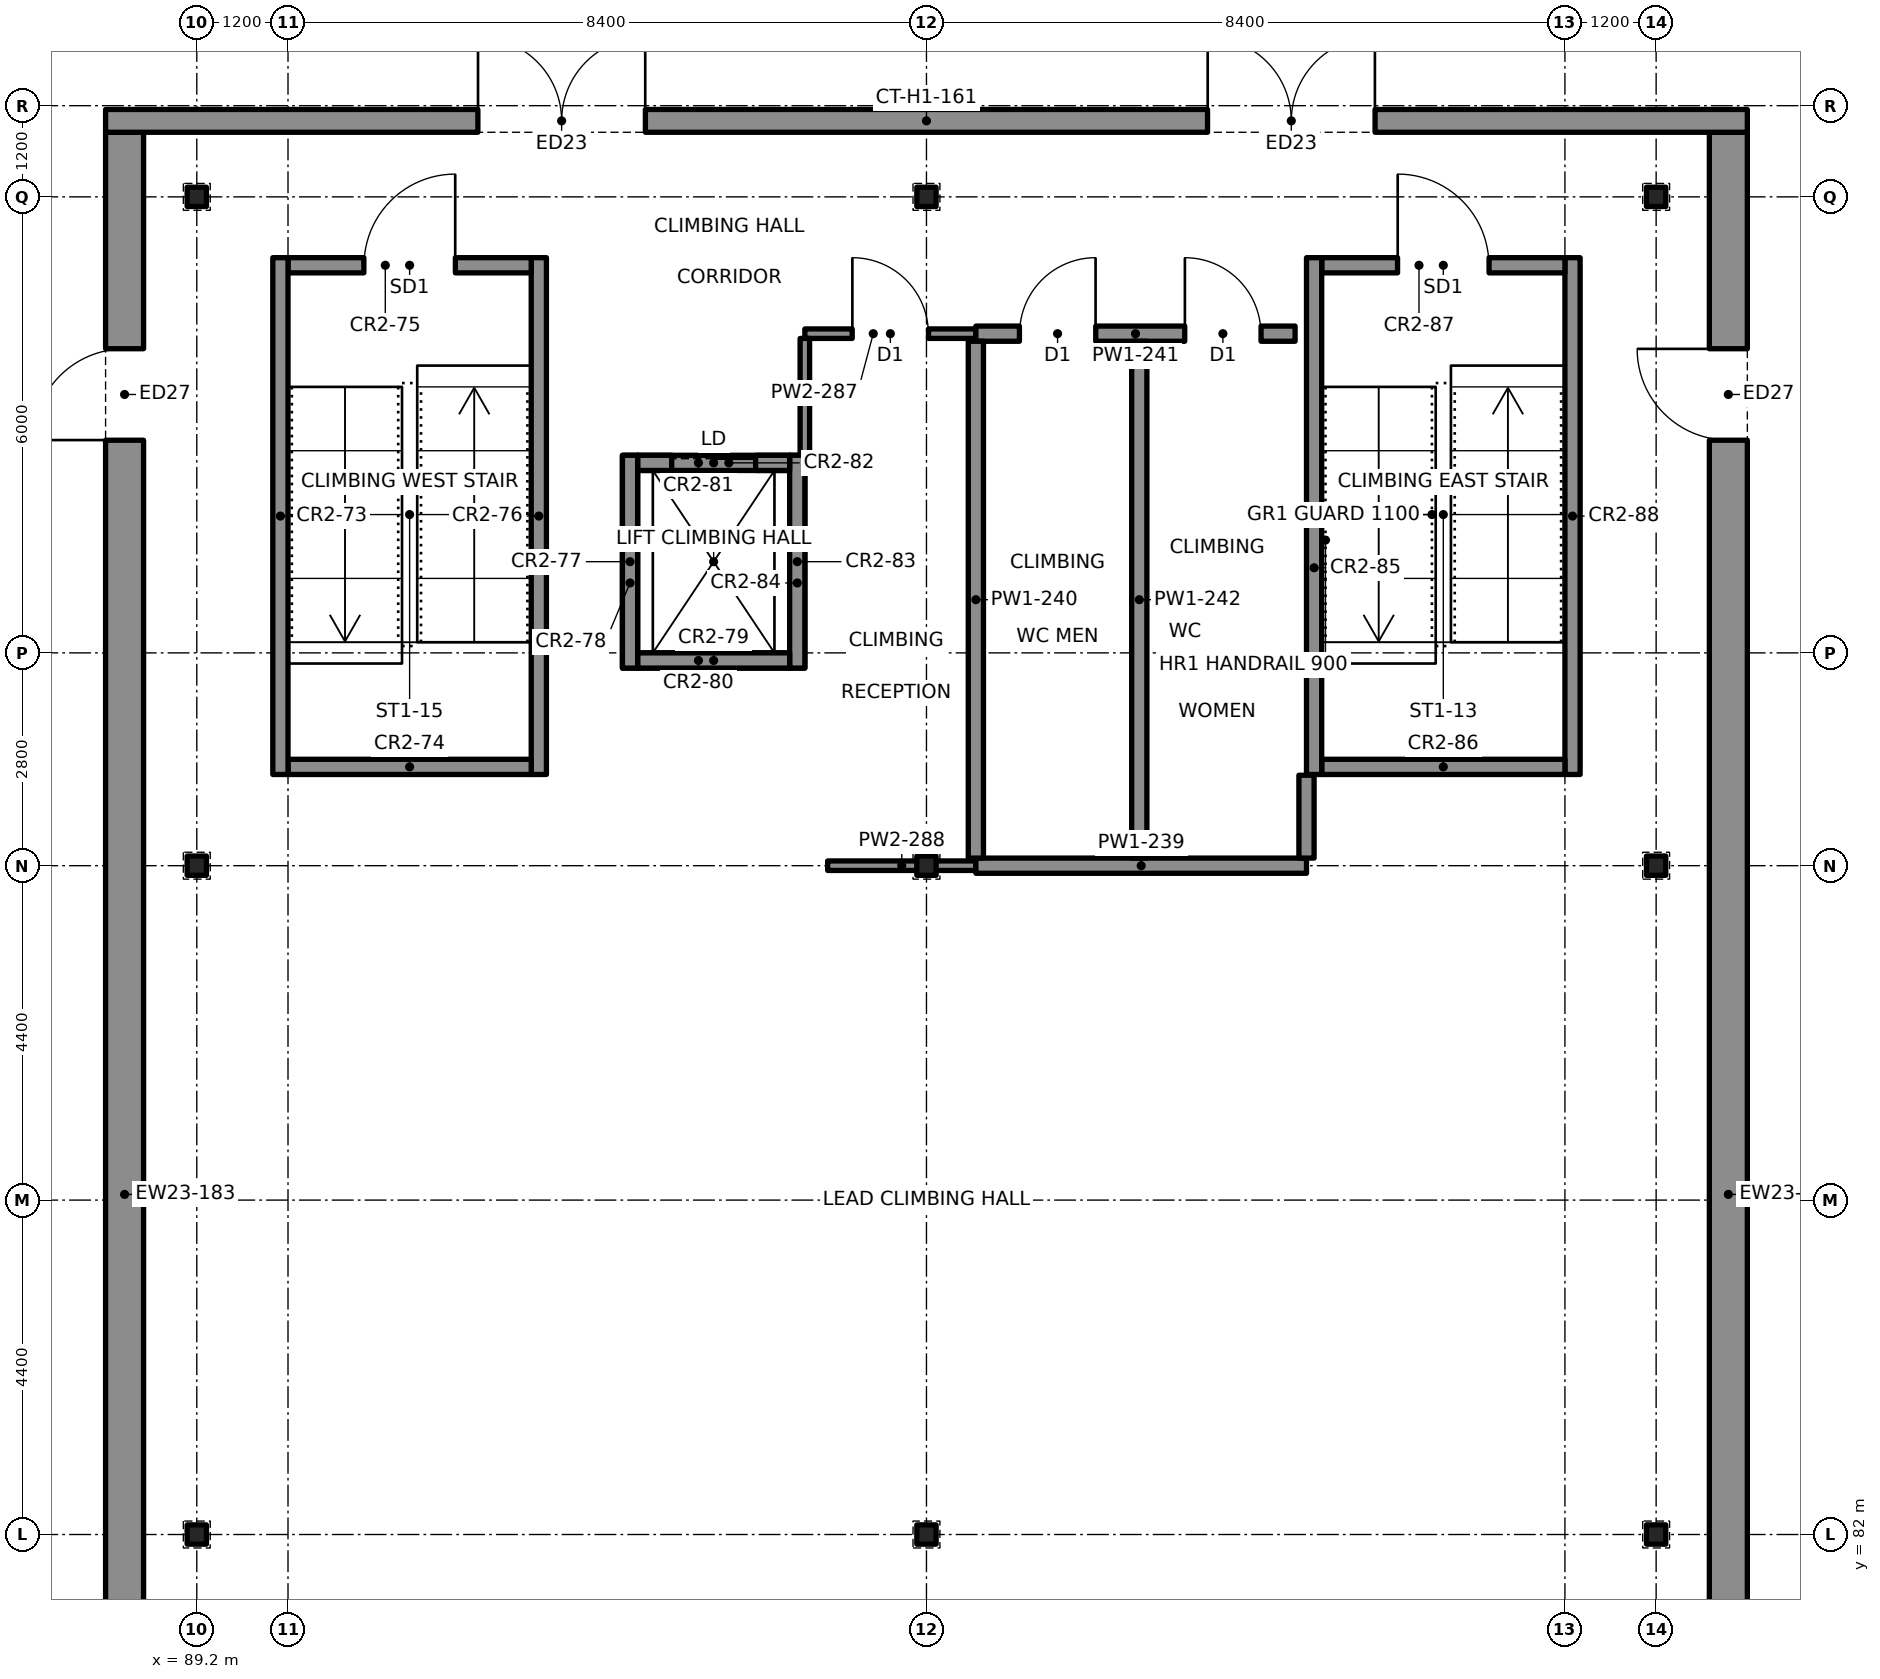
"""IFC4 building model, lengths in metres.
Left out: names, types, materials, properties, quantities, classifications, styles, units other than length and angle.
Written with IfcOpenShell. Run it as: python <this file> out.ifc"""

import sys

from ifc_helpers import new_model, si_unit, direction, frame, frame_2d, origin, origin_2d, place, context, subcontext, project, spatial, rectangle, hollow_rectangle, extrude, element, fill, save


model = new_model("IFC4")
c1 = context("Model", 3, precision=1e-05, world=origin(), true_north=direction((0.0, 1.0)))
c2 = subcontext(c1, "Body", "Model", "MODEL_VIEW")
j1 = project(units=[si_unit("LENGTHUNIT", "METRE"), si_unit("PLANEANGLEUNIT", "RADIAN")], contexts=[c1])
p1 = place(None, origin())
s1 = spatial("IfcSite", under=j1, at=p1, CompositionType="ELEMENT")
p2 = place(p1, origin())
s2 = spatial("IfcBuilding", under=s1, at=p2, CompositionType="ELEMENT")
p3 = place(p2, origin())
s3 = spatial("IfcBuildingStorey", under=s2, at=p3, CompositionType="ELEMENT", Elevation=0.0)
for number, where, z_axis, x_axis in (
    (1, (89.2, 82.0, -0.5), (0.0, 0.0, 1.0), (1.0, 0.0, 0.0)),
    (2, (89.2, 90.8, -0.5), (0.0, 0.0, 1.0), (1.0, 0.0, 0.0)),
    (3, (89.2, 99.6, -0.5), (0.0, 0.0, 1.0), (1.0, 0.0, 0.0)),
    (4, (98.8, 82.0, -0.5), (0.0, 0.0, 1.0), (1.0, 0.0, 0.0)),
    (5, (98.8, 90.8, -0.5), (0.0, 0.0, 1.0), (1.0, 0.0, 0.0)),
    (6, (98.8, 99.6, -0.5), (0.0, 0.0, 1.0), (1.0, 0.0, 0.0)),
    (7, (108.4, 82.0, -0.5), (0.0, 0.0, 1.0), (1.0, 0.0, 0.0)),
    (8, (108.4, 90.8, -0.5), (0.0, 0.0, 1.0), (1.0, 0.0, 0.0)),
    (9, (108.4, 99.6, -0.5), (0.0, 0.0, 1.0), (1.0, 0.0, 0.0)),
):
    element("IfcColumn", number, at=place(p3, frame(where, z_axis=z_axis, x_axis=x_axis)), inside=s3, PredefinedType="COLUMN", context=c2, shape_type="SweptSolid", body=[
        extrude(hollow_rectangle(XDim=0.254, YDim=0.254, WallThickness=0.013, at=origin_2d()), origin(), (0.0, 0.0, 1.0), 4.9),
    ])
p4 = place(p3, frame((88.0, 100.6, -0.5), z_axis=(0.0, 0.0, 1.0), x_axis=(1.0, 0.0, 0.0)))
e10 = element("IfcWall", 10, at=p4, inside=s3, PredefinedType="SOLIDWALL", context=c2, shape_type="SweptSolid", body=[
    extrude(rectangle(XDim=21.6, YDim=0.3, at=frame_2d((10.8, 0.0))), origin(), (0.0, 0.0, 1.0), 4.9),
])
p5 = place(p4, frame((4.9, 0.0, 0.5)))
e11 = element("IfcOpeningElement", 11, at=p5, cuts=e10, PredefinedType="OPENING", context=c2, shape_type="SweptSolid", body=[
    extrude(rectangle(XDim=2.2, YDim=2.4, at=frame_2d((1.1, 1.2))), frame((0.0, 0.16, 0.0), z_axis=(0.0, -1.0, 0.0), x_axis=(1.0, 0.0, 0.0)), (0.0, 0.0, 1.0), 0.32),
])
p6 = place(p4, frame((14.5, 0.0, 0.5)))
e12 = element("IfcOpeningElement", 12, at=p6, cuts=e10, PredefinedType="OPENING", context=c2, shape_type="SweptSolid", body=[
    extrude(rectangle(XDim=2.2, YDim=2.4, at=frame_2d((1.1, 1.2))), frame((0.0, 0.16, 0.0), z_axis=(0.0, -1.0, 0.0), x_axis=(1.0, 0.0, 0.0)), (0.0, 0.0, 1.0), 0.32),
])
p7 = place(p3, frame((88.25, 72.5, 0.0), z_axis=(0.0, 0.0, 1.0), x_axis=(0.0, 1.0, 0.0)))
e13 = element("IfcWall", 13, at=p7, inside=s3, PredefinedType="SOLIDWALL", context=c2, shape_type="SweptSolid", body=[
    extrude(rectangle(XDim=27.95, YDim=0.5, at=frame_2d((13.975, 0.0))), origin(), (0.0, 0.0, 1.0), 4.4),
])
p8 = place(p7, frame((4.0, 0.0, 0.0)))
e14 = element("IfcOpeningElement", 14, at=p8, cuts=e13, PredefinedType="OPENING", context=c2, shape_type="SweptSolid", body=[
    extrude(rectangle(XDim=2.2, YDim=2.4, at=frame_2d((1.1, 1.2))), frame((0.0, 0.26, 0.0), z_axis=(0.0, -1.0, 0.0), x_axis=(1.0, 0.0, 0.0)), (0.0, 0.0, 1.0), 0.52),
])
p9 = place(p7, frame((23.9, 0.0, 0.0)))
e15 = element("IfcOpeningElement", 15, at=p9, cuts=e13, PredefinedType="OPENING", context=c2, shape_type="SweptSolid", body=[
    extrude(rectangle(XDim=1.2, YDim=2.4, at=frame_2d((0.6, 1.2))), frame((0.0, 0.26, 0.0), z_axis=(0.0, -1.0, 0.0), x_axis=(1.0, 0.0, 0.0)), (0.0, 0.0, 1.0), 0.52),
])
p10 = place(p3, frame((109.35, 72.5, 0.0), z_axis=(0.0, 0.0, 1.0), x_axis=(0.0, 1.0, 0.0)))
e16 = element("IfcWall", 16, at=p10, inside=s3, PredefinedType="SOLIDWALL", context=c2, shape_type="SweptSolid", body=[
    extrude(rectangle(XDim=27.95, YDim=0.5, at=frame_2d((13.975, 0.0))), origin(), (0.0, 0.0, 1.0), 4.4),
])
p11 = place(p10, frame((4.0, 0.0, 0.0)))
e17 = element("IfcOpeningElement", 17, at=p11, cuts=e16, PredefinedType="OPENING", context=c2, shape_type="SweptSolid", body=[
    extrude(rectangle(XDim=2.2, YDim=2.4, at=frame_2d((1.1, 1.2))), frame((0.0, 0.26, 0.0), z_axis=(0.0, -1.0, 0.0), x_axis=(1.0, 0.0, 0.0)), (0.0, 0.0, 1.0), 0.52),
])
p12 = place(p10, frame((23.9, 0.0, 0.0)))
e18 = element("IfcOpeningElement", 18, at=p12, cuts=e16, PredefinedType="OPENING", context=c2, shape_type="SweptSolid", body=[
    extrude(rectangle(XDim=1.2, YDim=2.4, at=frame_2d((0.6, 1.2))), frame((0.0, 0.26, 0.0), z_axis=(0.0, -1.0, 0.0), x_axis=(1.0, 0.0, 0.0)), (0.0, 0.0, 1.0), 0.52),
])
for number, where, z_axis, x_axis in (
    (19, (103.9, 92.0, 0.0), (0.0, 0.0, 1.0), (0.0, 1.0, 0.0)),
    (20, (107.3, 92.0, 0.0), (0.0, 0.0, 1.0), (0.0, 1.0, 0.0)),
):
    element("IfcWall", number, at=place(p3, frame(where, z_axis=z_axis, x_axis=x_axis)), inside=s3, PredefinedType="SOLIDWALL", context=c2, shape_type="SweptSolid", body=[
        extrude(rectangle(XDim=6.8, YDim=0.2, at=frame_2d((3.4, 0.0))), origin(), (0.0, 0.0, 1.0), 4.4),
    ])
p13 = place(p3, frame((104.0, 92.1, 0.0), z_axis=(0.0, 0.0, 1.0), x_axis=(1.0, 0.0, 0.0)))
e21 = element("IfcWall", 21, at=p13, inside=s3, PredefinedType="SOLIDWALL", context=c2, shape_type="SweptSolid", body=[
    extrude(rectangle(XDim=3.2, YDim=0.2, at=frame_2d((1.6, 0.0))), origin(), (0.0, 0.0, 1.0), 4.4),
])
p14 = place(p3, frame((104.0, 98.7, 0.0), z_axis=(0.0, 0.0, 1.0), x_axis=(1.0, 0.0, 0.0)))
e22 = element("IfcWall", 22, at=p14, inside=s3, PredefinedType="SOLIDWALL", context=c2, shape_type="SweptSolid", body=[
    extrude(rectangle(XDim=3.2, YDim=0.2, at=frame_2d((1.6, 0.0))), origin(), (0.0, 0.0, 1.0), 4.4),
])
p15 = place(p14, frame((1.0, 0.0, 0.0)))
e23 = element("IfcOpeningElement", 23, at=p15, cuts=e22, PredefinedType="OPENING", context=c2, shape_type="SweptSolid", body=[
    extrude(rectangle(XDim=1.2, YDim=2.1, at=frame_2d((0.6, 1.05))), frame((0.0, 0.11, 0.0), z_axis=(0.0, -1.0, 0.0), x_axis=(1.0, 0.0, 0.0)), (0.0, 0.0, 1.0), 0.22),
])
for number, where, z_axis, x_axis in (
    (24, (90.3, 92.0, 0.0), (0.0, 0.0, 1.0), (0.0, 1.0, 0.0)),
    (25, (93.7, 92.0, 0.0), (0.0, 0.0, 1.0), (0.0, 1.0, 0.0)),
):
    element("IfcWall", number, at=place(p3, frame(where, z_axis=z_axis, x_axis=x_axis)), inside=s3, PredefinedType="SOLIDWALL", context=c2, shape_type="SweptSolid", body=[
        extrude(rectangle(XDim=6.8, YDim=0.2, at=frame_2d((3.4, 0.0))), origin(), (0.0, 0.0, 1.0), 4.4),
    ])
p16 = place(p3, frame((90.4, 92.1, 0.0), z_axis=(0.0, 0.0, 1.0), x_axis=(1.0, 0.0, 0.0)))
e26 = element("IfcWall", 26, at=p16, inside=s3, PredefinedType="SOLIDWALL", context=c2, shape_type="SweptSolid", body=[
    extrude(rectangle(XDim=3.2, YDim=0.2, at=frame_2d((1.6, 0.0))), origin(), (0.0, 0.0, 1.0), 4.4),
])
p17 = place(p3, frame((90.4, 98.7, 0.0), z_axis=(0.0, 0.0, 1.0), x_axis=(1.0, 0.0, 0.0)))
e27 = element("IfcWall", 27, at=p17, inside=s3, PredefinedType="SOLIDWALL", context=c2, shape_type="SweptSolid", body=[
    extrude(rectangle(XDim=3.2, YDim=0.2, at=frame_2d((1.6, 0.0))), origin(), (0.0, 0.0, 1.0), 4.4),
])
p18 = place(p17, frame((1.0, 0.0, 0.0)))
e28 = element("IfcOpeningElement", 28, at=p18, cuts=e27, PredefinedType="OPENING", context=c2, shape_type="SweptSolid", body=[
    extrude(rectangle(XDim=1.2, YDim=2.1, at=frame_2d((0.6, 1.05))), frame((0.0, 0.11, 0.0), z_axis=(0.0, -1.0, 0.0), x_axis=(1.0, 0.0, 0.0)), (0.0, 0.0, 1.0), 0.22),
])
for number, where, z_axis, x_axis in (
    (29, (94.9, 93.4, -1.5), (0.0, 0.0, 1.0), (0.0, 1.0, 0.0)),
    (30, (97.1, 93.4, -1.5), (0.0, 0.0, 1.0), (0.0, 1.0, 0.0)),
):
    element("IfcWall", number, at=place(p3, frame(where, z_axis=z_axis, x_axis=x_axis)), inside=s3, PredefinedType="SOLIDWALL", context=c2, shape_type="SweptSolid", body=[
        extrude(rectangle(XDim=2.8, YDim=0.2, at=frame_2d((1.4, 0.0))), origin(), (0.0, 0.0, 1.0), 1.5),
    ])
for number, where, z_axis, x_axis in (
    (31, (95.0, 93.5, -1.5), (0.0, 0.0, 1.0), (1.0, 0.0, 0.0)),
    (32, (95.0, 96.1, -1.5), (0.0, 0.0, 1.0), (1.0, 0.0, 0.0)),
):
    element("IfcWall", number, at=place(p3, frame(where, z_axis=z_axis, x_axis=x_axis)), inside=s3, PredefinedType="SOLIDWALL", context=c2, shape_type="SweptSolid", body=[
        extrude(rectangle(XDim=2.0, YDim=0.2, at=frame_2d((1.0, 0.0))), origin(), (0.0, 0.0, 1.0), 1.5),
    ])
for number, where, z_axis, x_axis in (
    (33, (94.9, 93.4, 0.0), (0.0, 0.0, 1.0), (0.0, 1.0, 0.0)),
    (34, (97.1, 93.4, 0.0), (0.0, 0.0, 1.0), (0.0, 1.0, 0.0)),
):
    element("IfcWall", number, at=place(p3, frame(where, z_axis=z_axis, x_axis=x_axis)), inside=s3, PredefinedType="SOLIDWALL", context=c2, shape_type="SweptSolid", body=[
        extrude(rectangle(XDim=2.8, YDim=0.2, at=frame_2d((1.4, 0.0))), origin(), (0.0, 0.0, 1.0), 4.4),
    ])
p19 = place(p3, frame((95.0, 93.5, 0.0), z_axis=(0.0, 0.0, 1.0), x_axis=(1.0, 0.0, 0.0)))
e35 = element("IfcWall", 35, at=p19, inside=s3, PredefinedType="SOLIDWALL", context=c2, shape_type="SweptSolid", body=[
    extrude(rectangle(XDim=2.0, YDim=0.2, at=frame_2d((1.0, 0.0))), origin(), (0.0, 0.0, 1.0), 4.4),
])
p20 = place(p3, frame((95.0, 96.1, 0.0), z_axis=(0.0, 0.0, 1.0), x_axis=(1.0, 0.0, 0.0)))
e36 = element("IfcWall", 36, at=p20, inside=s3, PredefinedType="SOLIDWALL", context=c2, shape_type="SweptSolid", body=[
    extrude(rectangle(XDim=2.0, YDim=0.2, at=frame_2d((1.0, 0.0))), origin(), (0.0, 0.0, 1.0), 4.4),
])
p21 = place(p20, frame((0.45, 0.0, 0.0)))
e37 = element("IfcOpeningElement", 37, at=p21, cuts=e36, PredefinedType="OPENING", context=c2, shape_type="SweptSolid", body=[
    extrude(rectangle(XDim=1.1, YDim=2.1, at=frame_2d((0.55, 1.05))), frame((0.0, 0.11, 0.0), z_axis=(0.0, -1.0, 0.0), x_axis=(1.0, 0.0, 0.0)), (0.0, 0.0, 1.0), 0.22),
])
p22 = place(p3, frame((97.5, 90.8, 0.0), z_axis=(0.0, 0.0, 1.0), x_axis=(1.0, 0.0, 0.0)))
e38 = element("IfcWall", 38, at=p22, inside=s3, PredefinedType="PARTITIONING", context=c2, shape_type="SweptSolid", body=[
    extrude(rectangle(XDim=1.95, YDim=0.125, at=frame_2d((0.975, 0.0))), origin(), (0.0, 0.0, 1.0), 3.65),
])
p23 = place(p3, frame((99.45, 90.8, 0.0), z_axis=(0.0, 0.0, 1.0), x_axis=(1.0, 0.0, 0.0)))
e39 = element("IfcWall", 39, at=p23, inside=s3, PredefinedType="PARTITIONING", context=c2, shape_type="SweptSolid", body=[
    extrude(rectangle(XDim=4.35, YDim=0.2, at=frame_2d((2.175, 0.0))), origin(), (0.0, 0.0, 1.0), 3.65),
])
p24 = place(p3, frame((97.2, 97.8, 0.0), z_axis=(0.0, 0.0, 1.0), x_axis=(1.0, 0.0, 0.0)))
e40 = element("IfcWall", 40, at=p24, inside=s3, PredefinedType="PARTITIONING", context=c2, shape_type="SweptSolid", body=[
    extrude(rectangle(XDim=2.25, YDim=0.125, at=frame_2d((1.125, 0.0))), origin(), (0.0, 0.0, 1.0), 3.65),
])
p25 = place(p24, frame((0.625, 0.0, 0.0)))
e41 = element("IfcOpeningElement", 41, at=p25, cuts=e40, PredefinedType="OPENING", context=c2, shape_type="SweptSolid", body=[
    extrude(rectangle(XDim=1.0, YDim=2.1, at=frame_2d((0.5, 1.05))), frame((0.0, 0.073, 0.0), z_axis=(0.0, -1.0, 0.0), x_axis=(1.0, 0.0, 0.0)), (0.0, 0.0, 1.0), 0.145),
])
p26 = place(p3, frame((99.45, 97.8, 0.0), z_axis=(0.0, 0.0, 1.0), x_axis=(1.0, 0.0, 0.0)))
e42 = element("IfcWall", 42, at=p26, inside=s3, PredefinedType="PARTITIONING", context=c2, shape_type="SweptSolid", body=[
    extrude(rectangle(XDim=4.2, YDim=0.2, at=frame_2d((2.1, 0.0))), origin(), (0.0, 0.0, 1.0), 3.65),
])
p27 = place(p26, frame((0.575, 0.0, 0.0)))
e43 = element("IfcOpeningElement", 43, at=p27, cuts=e42, PredefinedType="OPENING", context=c2, shape_type="SweptSolid", body=[
    extrude(rectangle(XDim=1.0, YDim=2.1, at=frame_2d((0.5, 1.05))), frame((0.0, 0.11, 0.0), z_axis=(0.0, -1.0, 0.0), x_axis=(1.0, 0.0, 0.0)), (0.0, 0.0, 1.0), 0.22),
])
p28 = place(p26, frame((2.75, 0.0, 0.0)))
e44 = element("IfcOpeningElement", 44, at=p28, cuts=e42, PredefinedType="OPENING", context=c2, shape_type="SweptSolid", body=[
    extrude(rectangle(XDim=1.0, YDim=2.1, at=frame_2d((0.5, 1.05))), frame((0.0, 0.11, 0.0), z_axis=(0.0, -1.0, 0.0), x_axis=(1.0, 0.0, 0.0)), (0.0, 0.0, 1.0), 0.22),
])
p29 = place(p3, frame((97.2, 96.2, 0.0), z_axis=(0.0, 0.0, 1.0), x_axis=(0.0, 1.0, 0.0)))
e45 = element("IfcWall", 45, at=p29, inside=s3, PredefinedType="PARTITIONING", context=c2, shape_type="SweptSolid", body=[
    extrude(rectangle(XDim=1.538, YDim=0.125, at=frame_2d((0.769, 0.0))), origin(), (0.0, 0.0, 1.0), 3.65),
])
for number, where, z_axis, x_axis in (
    (46, (99.45, 90.9, 0.0), (0.0, 0.0, 1.0), (0.0, 1.0, 0.0)),
    (47, (101.6, 90.9, 0.0), (0.0, 0.0, 1.0), (0.0, 1.0, 0.0)),
):
    element("IfcWall", number, at=place(p3, frame(where, z_axis=z_axis, x_axis=x_axis)), inside=s3, PredefinedType="PARTITIONING", context=c2, shape_type="SweptSolid", body=[
        extrude(rectangle(XDim=6.8, YDim=0.2, at=frame_2d((3.4, 0.0))), origin(), (0.0, 0.0, 1.0), 3.65),
    ])
p30 = place(p3, frame((103.8, 90.9, 0.0), z_axis=(0.0, 0.0, 1.0), x_axis=(0.0, 1.0, 0.0)))
e48 = element("IfcWall", 48, at=p30, inside=s3, PredefinedType="PARTITIONING", context=c2, shape_type="SweptSolid", body=[
    extrude(rectangle(XDim=1.09, YDim=0.2, at=frame_2d((0.545, 0.0))), origin(), (0.0, 0.0, 1.0), 3.65),
])
p31 = place(p9, origin())
e49 = element("IfcDoor", 49, at=p31, inside=s3, OperationType="SINGLE_SWING_LEFT", PredefinedType="DOOR", context=c2, shape_type="SweptSolid", body=[
    extrude(rectangle(XDim=1.2, YDim=2.4, at=frame_2d((0.6, 1.2))), frame((0.0, 0.025, 0.0), z_axis=(0.0, -1.0, 0.0), x_axis=(1.0, 0.0, 0.0)), (0.0, 0.0, 1.0), 0.05),
])
fill(e15, e49)
p32 = place(p12, origin())
e50 = element("IfcDoor", 50, at=p32, inside=s3, OperationType="SINGLE_SWING_RIGHT", PredefinedType="DOOR", context=c2, shape_type="SweptSolid", body=[
    extrude(rectangle(XDim=1.2, YDim=2.4, at=frame_2d((0.6, 1.2))), frame((0.0, 0.025, 0.0), z_axis=(0.0, -1.0, 0.0), x_axis=(1.0, 0.0, 0.0)), (0.0, 0.0, 1.0), 0.05),
])
fill(e18, e50)
p33 = place(p5, origin())
e51 = element("IfcDoor", 51, at=p33, inside=s3, OperationType="DOUBLE_DOOR_SINGLE_SWING", PredefinedType="DOOR", context=c2, shape_type="SweptSolid", body=[
    extrude(rectangle(XDim=2.2, YDim=2.4, at=frame_2d((1.1, 1.2))), frame((0.0, 0.025, 0.0), z_axis=(0.0, -1.0, 0.0), x_axis=(1.0, 0.0, 0.0)), (0.0, 0.0, 1.0), 0.05),
])
fill(e11, e51)
p34 = place(p6, origin())
e52 = element("IfcDoor", 52, at=p34, inside=s3, OperationType="DOUBLE_DOOR_SINGLE_SWING", PredefinedType="DOOR", context=c2, shape_type="SweptSolid", body=[
    extrude(rectangle(XDim=2.2, YDim=2.4, at=frame_2d((1.1, 1.2))), frame((0.0, 0.025, 0.0), z_axis=(0.0, -1.0, 0.0), x_axis=(1.0, 0.0, 0.0)), (0.0, 0.0, 1.0), 0.05),
])
fill(e12, e52)
p35 = place(p15, origin())
e53 = element("IfcDoor", 53, at=p35, inside=s3, OperationType="SINGLE_SWING_LEFT", PredefinedType="DOOR", context=c2, shape_type="SweptSolid", body=[
    extrude(rectangle(XDim=1.2, YDim=2.1, at=frame_2d((0.6, 1.05))), frame((0.0, 0.025, 0.0), z_axis=(0.0, -1.0, 0.0), x_axis=(1.0, 0.0, 0.0)), (0.0, 0.0, 1.0), 0.05),
])
fill(e23, e53)
p36 = place(p18, origin())
e54 = element("IfcDoor", 54, at=p36, inside=s3, OperationType="SINGLE_SWING_RIGHT", PredefinedType="DOOR", context=c2, shape_type="SweptSolid", body=[
    extrude(rectangle(XDim=1.2, YDim=2.1, at=frame_2d((0.6, 1.05))), frame((0.0, 0.025, 0.0), z_axis=(0.0, -1.0, 0.0), x_axis=(1.0, 0.0, 0.0)), (0.0, 0.0, 1.0), 0.05),
])
fill(e28, e54)
p37 = place(p21, origin())
e55 = element("IfcDoor", 55, at=p37, inside=s3, OperationType="SLIDING_TO_LEFT", PredefinedType="DOOR", context=c2, shape_type="SweptSolid", body=[
    extrude(rectangle(XDim=1.1, YDim=2.1, at=frame_2d((0.55, 1.05))), frame((0.0, 0.025, 0.0), z_axis=(0.0, -1.0, 0.0), x_axis=(1.0, 0.0, 0.0)), (0.0, 0.0, 1.0), 0.05),
])
fill(e37, e55)
p38 = place(p25, origin())
e56 = element("IfcDoor", 56, at=p38, inside=s3, OperationType="SINGLE_SWING_LEFT", PredefinedType="DOOR", context=c2, shape_type="SweptSolid", body=[
    extrude(rectangle(XDim=1.0, YDim=2.1, at=frame_2d((0.5, 1.05))), frame((0.0, 0.025, 0.0), z_axis=(0.0, -1.0, 0.0), x_axis=(1.0, 0.0, 0.0)), (0.0, 0.0, 1.0), 0.05),
])
fill(e41, e56)
p39 = place(p27, origin())
e57 = element("IfcDoor", 57, at=p39, inside=s3, OperationType="SINGLE_SWING_RIGHT", PredefinedType="DOOR", context=c2, shape_type="SweptSolid", body=[
    extrude(rectangle(XDim=1.0, YDim=2.1, at=frame_2d((0.5, 1.05))), frame((0.0, 0.025, 0.0), z_axis=(0.0, -1.0, 0.0), x_axis=(1.0, 0.0, 0.0)), (0.0, 0.0, 1.0), 0.05),
])
fill(e43, e57)
p40 = place(p28, origin())
e58 = element("IfcDoor", 58, at=p40, inside=s3, OperationType="SINGLE_SWING_LEFT", PredefinedType="DOOR", context=c2, shape_type="SweptSolid", body=[
    extrude(rectangle(XDim=1.0, YDim=2.1, at=frame_2d((0.5, 1.05))), frame((0.0, 0.025, 0.0), z_axis=(0.0, -1.0, 0.0), x_axis=(1.0, 0.0, 0.0)), (0.0, 0.0, 1.0), 0.05),
])
fill(e44, e58)
save(model, sys.argv[1])
